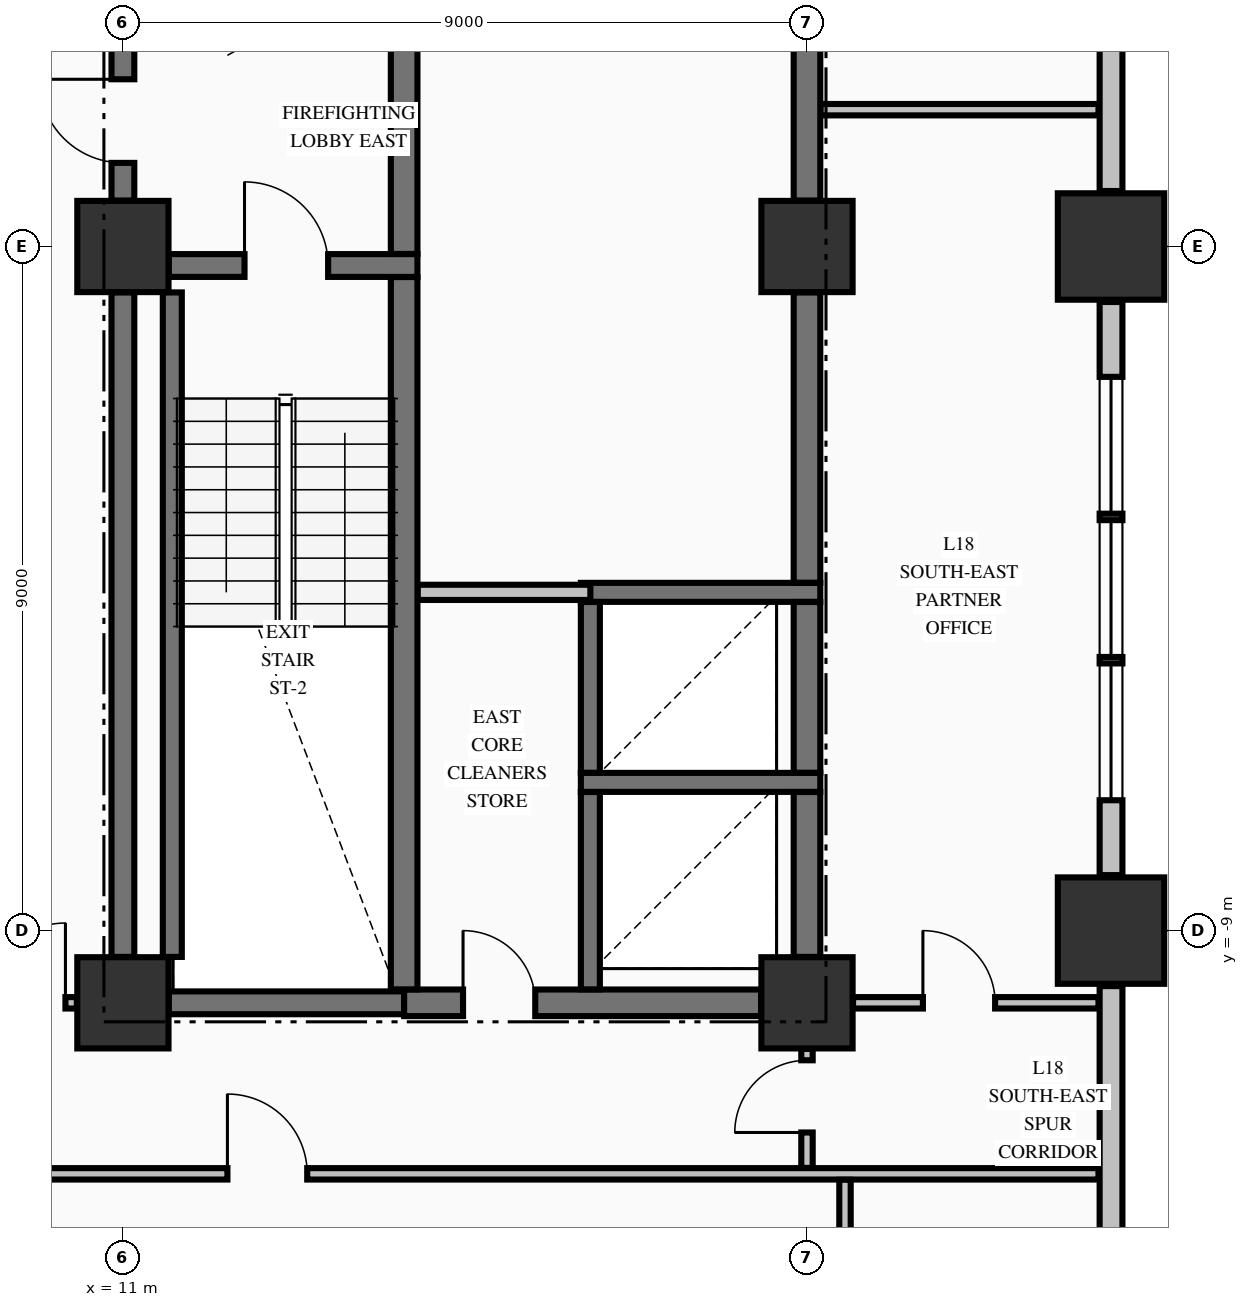
"""IFC4 building model, lengths in metres.
Left out: names, types, materials, properties, quantities, classifications, styles, units other than length and angle.
Written with IfcOpenShell. Run it as: python <this file> out.ifc"""

import sys

from ifc_helpers import new_model, si_unit, direction, frame, frame_2d, origin, origin_2d, place, context, subcontext, project, spatial, rectangle, extrude, element, fill, save


model = new_model("IFC4")
c1 = context("Model", 3, precision=1e-05, world=origin(), true_north=direction((0.0, 1.0)))
c2 = subcontext(c1, "Body", "Model", "MODEL_VIEW")
j1 = project(units=[si_unit("LENGTHUNIT", "METRE"), si_unit("PLANEANGLEUNIT", "RADIAN")], contexts=[c1])
p1 = place(None, origin())
s1 = spatial("IfcSite", under=j1, at=p1, CompositionType="ELEMENT")
p2 = place(p1, origin())
s2 = spatial("IfcBuilding", under=s1, at=p2, CompositionType="ELEMENT")
p3 = place(p2, frame((0.0, 0.0, 75.04)))
s3 = spatial("IfcBuildingStorey", under=s2, at=p3, CompositionType="ELEMENT", Elevation=75.04)
for number, where, z_axis, x_axis in (
    (1, (24.0, -9.0, -0.25), (0.0, 0.0, 1.0), (1.0, 0.0, 0.0)),
    (2, (24.0, 0.0, -0.25), (0.0, 0.0, 1.0), (1.0, 0.0, 0.0)),
):
    element("IfcColumn", number, at=place(p3, frame(where, z_axis=z_axis, x_axis=x_axis)), inside=s3, PredefinedType="COLUMN", context=c2, shape_type="SweptSolid", body=[
        extrude(rectangle(XDim=1.4, YDim=1.4, at=origin_2d()), origin(), (0.0, 0.0, 1.0), 3.57),
    ])
for number, where, z_axis, x_axis in (
    (3, (11.0, -9.95, -0.25), (0.0, 0.0, 1.0), (1.0, 0.0, 0.0)),
    (4, (11.0, 0.0, -0.25), (0.0, 0.0, 1.0), (1.0, 0.0, 0.0)),
    (5, (20.0, -9.95, -0.25), (0.0, 0.0, 1.0), (1.0, 0.0, 0.0)),
    (6, (20.0, 0.0, -0.25), (0.0, 0.0, 1.0), (1.0, 0.0, 0.0)),
):
    element("IfcColumn", number, at=place(p3, frame(where, z_axis=z_axis, x_axis=x_axis)), inside=s3, PredefinedType="COLUMN", context=c2, shape_type="SweptSolid", body=[
        extrude(rectangle(XDim=1.2, YDim=1.2, at=origin_2d()), origin(), (0.0, 0.0, 1.0), 3.57),
    ])
p4 = place(p3, frame((24.0, -22.27, 0.0), z_axis=(0.0, 0.0, 1.0), x_axis=(0.0, 1.0, 0.0)))
e7 = element("IfcWall", 7, at=p4, inside=s3, PredefinedType="STANDARD", context=c2, shape_type="SweptSolid", body=[
    extrude(rectangle(XDim=12.54, YDim=0.3, at=frame_2d((6.27, 0.0))), origin(), (0.0, 0.0, 1.0), 2.712),
])
p5 = place(p3, frame((24.0, -8.27, 0.0), z_axis=(0.0, 0.0, 1.0), x_axis=(0.0, 1.0, 0.0)))
e8 = element("IfcWall", 8, at=p5, inside=s3, PredefinedType="STANDARD", context=c2, shape_type="SweptSolid", body=[
    extrude(rectangle(XDim=7.54, YDim=0.3, at=frame_2d((3.77, 0.0))), origin(), (0.0, 0.0, 1.0), 2.712),
])
p6 = place(p5, frame((0.985, 0.0, 0.78)))
e9 = element("IfcOpeningElement", 9, at=p6, cuts=e8, PredefinedType="OPENING", context=c2, shape_type="SweptSolid", body=[
    extrude(rectangle(XDim=1.8, YDim=1.72, at=frame_2d((0.9, 0.86))), frame((0.0, 0.16, 0.0), z_axis=(0.0, -1.0, 0.0), x_axis=(1.0, 0.0, 0.0)), (0.0, 0.0, 1.0), 0.32),
])
p7 = place(p5, frame((2.87, 0.0, 0.78)))
e10 = element("IfcOpeningElement", 10, at=p7, cuts=e8, PredefinedType="OPENING", context=c2, shape_type="SweptSolid", body=[
    extrude(rectangle(XDim=1.8, YDim=1.72, at=frame_2d((0.9, 0.86))), frame((0.0, 0.16, 0.0), z_axis=(0.0, -1.0, 0.0), x_axis=(1.0, 0.0, 0.0)), (0.0, 0.0, 1.0), 0.32),
])
p8 = place(p5, frame((4.755, 0.0, 0.78)))
e11 = element("IfcOpeningElement", 11, at=p8, cuts=e8, PredefinedType="OPENING", context=c2, shape_type="SweptSolid", body=[
    extrude(rectangle(XDim=1.8, YDim=1.72, at=frame_2d((0.9, 0.86))), frame((0.0, 0.16, 0.0), z_axis=(0.0, -1.0, 0.0), x_axis=(1.0, 0.0, 0.0)), (0.0, 0.0, 1.0), 0.32),
])
p9 = place(p3, frame((24.0, 0.73, 0.0), z_axis=(0.0, 0.0, 1.0), x_axis=(0.0, 1.0, 0.0)))
e12 = element("IfcWall", 12, at=p9, inside=s3, PredefinedType="STANDARD", context=c2, shape_type="SweptSolid", body=[
    extrude(rectangle(XDim=7.54, YDim=0.3, at=frame_2d((3.77, 0.0))), origin(), (0.0, 0.0, 1.0), 2.712),
])
p10 = place(p9, frame((2.87, 0.0, 0.78)))
e13 = element("IfcOpeningElement", 13, at=p10, cuts=e12, PredefinedType="OPENING", context=c2, shape_type="SweptSolid", body=[
    extrude(rectangle(XDim=1.8, YDim=1.72, at=frame_2d((0.9, 0.86))), frame((0.0, 0.16, 0.0), z_axis=(0.0, -1.0, 0.0), x_axis=(1.0, 0.0, 0.0)), (0.0, 0.0, 1.0), 0.32),
])
p11 = place(p9, frame((4.755, 0.0, 0.78)))
e14 = element("IfcOpeningElement", 14, at=p11, cuts=e12, PredefinedType="OPENING", context=c2, shape_type="SweptSolid", body=[
    extrude(rectangle(XDim=1.8, YDim=1.72, at=frame_2d((0.9, 0.86))), frame((0.0, 0.16, 0.0), z_axis=(0.0, -1.0, 0.0), x_axis=(1.0, 0.0, 0.0)), (0.0, 0.0, 1.0), 0.32),
])
p12 = place(p3, frame((11.604, -9.95, 0.0), z_axis=(0.0, 0.0, 1.0), x_axis=(1.0, 0.0, 0.0)))
e15 = element("IfcWall", 15, at=p12, inside=s3, PredefinedType="SHEAR", context=c2, shape_type="SweptSolid", body=[
    extrude(rectangle(XDim=3.096, YDim=0.3, at=frame_2d((1.548, 0.0))), origin(), (0.0, 0.0, 1.0), 3.32),
])
p13 = place(p3, frame((14.7, -9.95, 0.0), z_axis=(0.0, 0.0, 1.0), x_axis=(1.0, 0.0, 0.0)))
e16 = element("IfcWall", 16, at=p13, inside=s3, PredefinedType="SHEAR", context=c2, shape_type="SweptSolid", body=[
    extrude(rectangle(XDim=4.696, YDim=0.35, at=frame_2d((2.348, 0.0))), origin(), (0.0, 0.0, 1.0), 3.32),
])
p14 = place(p13, frame((0.775, 0.0, 0.0)))
e17 = element("IfcOpeningElement", 17, at=p14, cuts=e16, PredefinedType="OPENING", context=c2, shape_type="SweptSolid", body=[
    extrude(rectangle(XDim=0.95, YDim=2.15, at=frame_2d((0.475, 1.075))), frame((0.0, 0.185, 0.0), z_axis=(0.0, -1.0, 0.0), x_axis=(1.0, 0.0, 0.0)), (0.0, 0.0, 1.0), 0.37),
])
for number, where, z_axis, x_axis in (
    (18, (17.025, -7.05, 0.0), (0.0, 0.0, 1.0), (1.0, 0.0, 0.0)),
    (19, (17.025, -4.55, 0.0), (0.0, 0.0, 1.0), (1.0, 0.0, 0.0)),
):
    element("IfcWall", number, at=place(p3, frame(where, z_axis=z_axis, x_axis=x_axis)), inside=s3, PredefinedType="SOLIDWALL", context=c2, shape_type="SweptSolid", body=[
        extrude(rectangle(XDim=3.15, YDim=0.25, at=frame_2d((1.575, 0.0))), origin(), (0.0, 0.0, 1.0), 3.32),
    ])
p15 = place(p3, frame((11.604, -0.25, 0.0), z_axis=(0.0, 0.0, 1.0), x_axis=(1.0, 0.0, 0.0)))
e20 = element("IfcWall", 20, at=p15, inside=s3, PredefinedType="SHEAR", context=c2, shape_type="SweptSolid", body=[
    extrude(rectangle(XDim=3.271, YDim=0.3, at=frame_2d((1.635, 0.0))), origin(), (0.0, 0.0, 1.0), 3.32),
])
p16 = place(p15, frame((0.996, 0.0, 0.0)))
e21 = element("IfcOpeningElement", 21, at=p16, cuts=e20, PredefinedType="OPENING", context=c2, shape_type="SweptSolid", body=[
    extrude(rectangle(XDim=1.1, YDim=2.15, at=frame_2d((0.55, 1.075))), frame((0.0, 0.16, 0.0), z_axis=(0.0, -1.0, 0.0), x_axis=(1.0, 0.0, 0.0)), (0.0, 0.0, 1.0), 0.32),
])
p17 = place(p3, frame((-28.835, -12.2, 0.0), z_axis=(0.0, 0.0, 1.0), x_axis=(1.0, 0.0, 0.0)))
e22 = element("IfcWall", 22, at=p17, inside=s3, PredefinedType="PARTITIONING", context=c2, shape_type="SweptSolid", body=[
    extrude(rectangle(XDim=52.67, YDim=0.15, at=frame_2d((26.335, 0.0))), origin(), (0.0, 0.0, 1.0), 3.32),
])
p18 = place(p17, frame((30.685, 0.0, 0.0)))
e23 = element("IfcOpeningElement", 23, at=p18, cuts=e22, PredefinedType="OPENING", context=c2, shape_type="SweptSolid", body=[
    extrude(rectangle(XDim=1.1, YDim=2.15, at=frame_2d((0.55, 1.075))), frame((0.0, 0.085, 0.0), z_axis=(0.0, -1.0, 0.0), x_axis=(1.0, 0.0, 0.0)), (0.0, 0.0, 1.0), 0.17),
])
p19 = place(p17, frame((15.41, 0.0, 0.0)))
e24 = element("IfcOpeningElement", 24, at=p19, cuts=e22, PredefinedType="OPENING", context=c2, shape_type="SweptSolid", body=[
    extrude(rectangle(XDim=1.05, YDim=2.15, at=frame_2d((0.525, 1.075))), frame((0.0, 0.085, 0.0), z_axis=(0.0, -1.0, 0.0), x_axis=(1.0, 0.0, 0.0)), (0.0, 0.0, 1.0), 0.17),
])
p20 = place(p17, frame((41.21, 0.0, 0.0)))
e25 = element("IfcOpeningElement", 25, at=p20, cuts=e22, PredefinedType="OPENING", context=c2, shape_type="SweptSolid", body=[
    extrude(rectangle(XDim=1.05, YDim=2.15, at=frame_2d((0.525, 1.075))), frame((0.0, 0.085, 0.0), z_axis=(0.0, -1.0, 0.0), x_axis=(1.0, 0.0, 0.0)), (0.0, 0.0, 1.0), 0.17),
])
p21 = place(p3, frame((-10.394, -9.95, 0.0), z_axis=(0.0, 0.0, 1.0), x_axis=(1.0, 0.0, 0.0)))
e26 = element("IfcWall", 26, at=p21, inside=s3, PredefinedType="PARTITIONING", context=c2, shape_type="SweptSolid", body=[
    extrude(rectangle(XDim=20.788, YDim=0.15, at=frame_2d((10.394, 0.0))), origin(), (0.0, 0.0, 1.0), 3.32),
])
p22 = place(p21, frame((0.15, 0.0, 0.0)))
e27 = element("IfcOpeningElement", 27, at=p22, cuts=e26, PredefinedType="OPENING", context=c2, shape_type="SweptSolid", body=[
    extrude(rectangle(XDim=1.05, YDim=2.15, at=frame_2d((0.525, 1.075))), frame((0.0, 0.085, 0.0), z_axis=(0.0, -1.0, 0.0), x_axis=(1.0, 0.0, 0.0)), (0.0, 0.0, 1.0), 0.17),
])
p23 = place(p21, frame((19.588, 0.0, 0.0)))
e28 = element("IfcOpeningElement", 28, at=p23, cuts=e26, PredefinedType="OPENING", context=c2, shape_type="SweptSolid", body=[
    extrude(rectangle(XDim=1.05, YDim=2.15, at=frame_2d((0.525, 1.075))), frame((0.0, 0.085, 0.0), z_axis=(0.0, -1.0, 0.0), x_axis=(1.0, 0.0, 0.0)), (0.0, 0.0, 1.0), 0.17),
])
p24 = place(p21, frame((11.769, 0.0, 0.0)))
e29 = element("IfcOpeningElement", 29, at=p24, cuts=e26, PredefinedType="OPENING", context=c2, shape_type="SweptSolid", body=[
    extrude(rectangle(XDim=0.95, YDim=2.15, at=frame_2d((0.475, 1.075))), frame((0.0, 0.085, 0.0), z_axis=(0.0, -1.0, 0.0), x_axis=(1.0, 0.0, 0.0)), (0.0, 0.0, 1.0), 0.17),
])
p25 = place(p3, frame((20.606, -9.95, 0.0), z_axis=(0.0, 0.0, 1.0), x_axis=(1.0, 0.0, 0.0)))
e30 = element("IfcWall", 30, at=p25, inside=s3, PredefinedType="PARTITIONING", context=c2, shape_type="SweptSolid", body=[
    extrude(rectangle(XDim=3.229, YDim=0.15, at=frame_2d((1.615, 0.0))), origin(), (0.0, 0.0, 1.0), 3.32),
])
p26 = place(p25, frame((0.919, 0.0, 0.0)))
e31 = element("IfcOpeningElement", 31, at=p26, cuts=e30, PredefinedType="OPENING", context=c2, shape_type="SweptSolid", body=[
    extrude(rectangle(XDim=0.95, YDim=2.15, at=frame_2d((0.475, 1.075))), frame((0.0, 0.085, 0.0), z_axis=(0.0, -1.0, 0.0), x_axis=(1.0, 0.0, 0.0)), (0.0, 0.0, 1.0), 0.17),
])
p27 = place(p3, frame((14.878, -4.55, 0.0), z_axis=(0.0, 0.0, 1.0), x_axis=(1.0, 0.0, 0.0)))
e32 = element("IfcWall", 32, at=p27, inside=s3, PredefinedType="PARTITIONING", context=c2, shape_type="SweptSolid", body=[
    extrude(rectangle(XDim=2.272, YDim=0.2, at=frame_2d((1.136, 0.0))), origin(), (0.0, 0.0, 1.0), 3.32),
])
p28 = place(p3, frame((20.178, 1.8, 0.0), z_axis=(0.0, 0.0, 1.0), x_axis=(1.0, 0.0, 0.0)))
e33 = element("IfcWall", 33, at=p28, inside=s3, PredefinedType="PARTITIONING", context=c2, shape_type="SweptSolid", body=[
    extrude(rectangle(XDim=3.657, YDim=0.15, at=frame_2d((1.829, 0.0))), origin(), (0.0, 0.0, 1.0), 3.32),
])
p29 = place(p3, frame((11.0, -9.346, 0.0), z_axis=(0.0, 0.0, 1.0), x_axis=(0.0, 1.0, 0.0)))
e34 = element("IfcWall", 34, at=p29, inside=s3, PredefinedType="SHEAR", context=c2, shape_type="SweptSolid", body=[
    extrude(rectangle(XDim=8.742, YDim=0.3, at=frame_2d((4.371, 0.0))), origin(), (0.0, 0.0, 1.0), 3.32),
])
p30 = place(p3, frame((11.0, 0.604, 0.0), z_axis=(0.0, 0.0, 1.0), x_axis=(0.0, 1.0, 0.0)))
e35 = element("IfcWall", 35, at=p30, inside=s3, PredefinedType="SHEAR", context=c2, shape_type="SweptSolid", body=[
    extrude(rectangle(XDim=2.144, YDim=0.3, at=frame_2d((1.072, 0.0))), origin(), (0.0, 0.0, 1.0), 3.32),
])
p31 = place(p30, frame((0.496, 0.0, 0.0)))
e36 = element("IfcOpeningElement", 36, at=p31, cuts=e35, PredefinedType="OPENING", context=c2, shape_type="SweptSolid", body=[
    extrude(rectangle(XDim=1.1, YDim=2.15, at=frame_2d((0.55, 1.075))), frame((0.0, 0.16, 0.0), z_axis=(0.0, -1.0, 0.0), x_axis=(1.0, 0.0, 0.0)), (0.0, 0.0, 1.0), 0.32),
])
p32 = place(p3, frame((11.65, -9.346, 0.0), z_axis=(0.0, 0.0, 1.0), x_axis=(0.0, 1.0, 0.0)))
e37 = element("IfcWall", 37, at=p32, inside=s3, PredefinedType="SOLIDWALL", context=c2, shape_type="SweptSolid", body=[
    extrude(rectangle(XDim=8.742, YDim=0.25, at=frame_2d((4.371, 0.0))), origin(), (0.0, 0.0, 1.0), 3.32),
])
p33 = place(p3, frame((14.7, -9.773, 0.0), z_axis=(0.0, 0.0, 1.0), x_axis=(0.0, 1.0, 0.0)))
e38 = element("IfcWall", 38, at=p33, inside=s3, PredefinedType="SHEAR", context=c2, shape_type="SweptSolid", body=[
    extrude(rectangle(XDim=9.371, YDim=0.35, at=frame_2d((4.686, 0.0))), origin(), (0.0, 0.0, 1.0), 3.32),
])
p34 = place(p3, frame((14.7, -0.098, 0.0), z_axis=(0.0, 0.0, 1.0), x_axis=(0.0, 1.0, 0.0)))
e39 = element("IfcWall", 39, at=p34, inside=s3, PredefinedType="SHEAR", context=c2, shape_type="SweptSolid", body=[
    extrude(rectangle(XDim=2.846, YDim=0.35, at=frame_2d((1.423, 0.0))), origin(), (0.0, 0.0, 1.0), 3.32),
])
p35 = place(p3, frame((17.15, -9.773, 0.0), z_axis=(0.0, 0.0, 1.0), x_axis=(0.0, 1.0, 0.0)))
e40 = element("IfcWall", 40, at=p35, inside=s3, PredefinedType="SOLIDWALL", context=c2, shape_type="SweptSolid", body=[
    extrude(rectangle(XDim=2.596, YDim=0.25, at=frame_2d((1.298, 0.0))), origin(), (0.0, 0.0, 1.0), 3.32),
])
p36 = place(p3, frame((17.15, -6.923, 0.0), z_axis=(0.0, 0.0, 1.0), x_axis=(0.0, 1.0, 0.0)))
e41 = element("IfcWall", 41, at=p36, inside=s3, PredefinedType="SOLIDWALL", context=c2, shape_type="SweptSolid", body=[
    extrude(rectangle(XDim=2.246, YDim=0.25, at=frame_2d((1.123, 0.0))), origin(), (0.0, 0.0, 1.0), 3.32),
])
p37 = place(p3, frame((20.0, -9.346, 0.0), z_axis=(0.0, 0.0, 1.0), x_axis=(0.0, 1.0, 0.0)))
e42 = element("IfcWall", 42, at=p37, inside=s3, PredefinedType="SHEAR", context=c2, shape_type="SweptSolid", body=[
    extrude(rectangle(XDim=2.169, YDim=0.35, at=frame_2d((1.084, 0.0))), origin(), (0.0, 0.0, 1.0), 3.32),
])
p38 = place(p3, frame((20.0, -6.923, 0.0), z_axis=(0.0, 0.0, 1.0), x_axis=(0.0, 1.0, 0.0)))
e43 = element("IfcWall", 43, at=p38, inside=s3, PredefinedType="SHEAR", context=c2, shape_type="SweptSolid", body=[
    extrude(rectangle(XDim=2.246, YDim=0.35, at=frame_2d((1.123, 0.0))), origin(), (0.0, 0.0, 1.0), 3.32),
])
p39 = place(p3, frame((20.0, -4.423, 0.0), z_axis=(0.0, 0.0, 1.0), x_axis=(0.0, 1.0, 0.0)))
e44 = element("IfcWall", 44, at=p39, inside=s3, PredefinedType="SHEAR", context=c2, shape_type="SweptSolid", body=[
    extrude(rectangle(XDim=3.819, YDim=0.35, at=frame_2d((1.91, 0.0))), origin(), (0.0, 0.0, 1.0), 3.32),
])
p40 = place(p3, frame((20.0, 0.604, 0.0), z_axis=(0.0, 0.0, 1.0), x_axis=(0.0, 1.0, 0.0)))
e45 = element("IfcWall", 45, at=p40, inside=s3, PredefinedType="SHEAR", context=c2, shape_type="SweptSolid", body=[
    extrude(rectangle(XDim=9.292, YDim=0.35, at=frame_2d((4.646, 0.0))), origin(), (0.0, 0.0, 1.0), 3.32),
])
p41 = place(p3, frame((20.0, -12.122, 0.0), z_axis=(0.0, 0.0, 1.0), x_axis=(0.0, 1.0, 0.0)))
e46 = element("IfcWall", 46, at=p41, inside=s3, PredefinedType="PARTITIONING", context=c2, shape_type="SweptSolid", body=[
    extrude(rectangle(XDim=1.566, YDim=0.15, at=frame_2d((0.783, 0.0))), origin(), (0.0, 0.0, 1.0), 3.32),
])
p42 = place(p41, frame((0.466, 0.0, 0.0)))
e47 = element("IfcOpeningElement", 47, at=p42, cuts=e46, PredefinedType="OPENING", context=c2, shape_type="SweptSolid", body=[
    extrude(rectangle(XDim=0.95, YDim=2.15, at=frame_2d((0.475, 1.075))), frame((0.0, 0.085, 0.0), z_axis=(0.0, -1.0, 0.0), x_axis=(1.0, 0.0, 0.0)), (0.0, 0.0, 1.0), 0.17),
])
p43 = place(p3, frame((20.5, -22.294, 0.0), z_axis=(0.0, 0.0, 1.0), x_axis=(0.0, 1.0, 0.0)))
e48 = element("IfcWall", 48, at=p43, inside=s3, PredefinedType="PARTITIONING", context=c2, shape_type="SweptSolid", body=[
    extrude(rectangle(XDim=10.016, YDim=0.15, at=frame_2d((5.008, 0.0))), origin(), (0.0, 0.0, 1.0), 3.32),
])
p44 = place(p6, origin())
e49 = element("IfcWindow", 49, at=p44, inside=s3, PartitioningType="SINGLE_PANEL", PredefinedType="WINDOW", context=c2, shape_type="SweptSolid", body=[
    extrude(rectangle(XDim=1.8, YDim=1.72, at=frame_2d((0.9, 0.86))), frame((0.0, 0.03, 0.0), z_axis=(0.0, -1.0, 0.0), x_axis=(1.0, 0.0, 0.0)), (0.0, 0.0, 1.0), 0.06),
])
fill(e9, e49)
p45 = place(p7, origin())
e50 = element("IfcWindow", 50, at=p45, inside=s3, PartitioningType="SINGLE_PANEL", PredefinedType="WINDOW", context=c2, shape_type="SweptSolid", body=[
    extrude(rectangle(XDim=1.8, YDim=1.72, at=frame_2d((0.9, 0.86))), frame((0.0, 0.03, 0.0), z_axis=(0.0, -1.0, 0.0), x_axis=(1.0, 0.0, 0.0)), (0.0, 0.0, 1.0), 0.06),
])
fill(e10, e50)
p46 = place(p8, origin())
e51 = element("IfcWindow", 51, at=p46, inside=s3, PartitioningType="SINGLE_PANEL", PredefinedType="WINDOW", context=c2, shape_type="SweptSolid", body=[
    extrude(rectangle(XDim=1.8, YDim=1.72, at=frame_2d((0.9, 0.86))), frame((0.0, 0.03, 0.0), z_axis=(0.0, -1.0, 0.0), x_axis=(1.0, 0.0, 0.0)), (0.0, 0.0, 1.0), 0.06),
])
fill(e11, e51)
p47 = place(p16, origin())
e52 = element("IfcDoor", 52, at=p47, inside=s3, OperationType="SINGLE_SWING_LEFT", PredefinedType="DOOR", context=c2, shape_type="SweptSolid", body=[
    extrude(rectangle(XDim=1.1, YDim=2.15, at=frame_2d((0.55, 1.075))), frame((0.0, 0.025, 0.0), z_axis=(0.0, -1.0, 0.0), x_axis=(1.0, 0.0, 0.0)), (0.0, 0.0, 1.0), 0.05),
])
fill(e21, e52)
p48 = place(p31, origin())
e53 = element("IfcDoor", 53, at=p48, inside=s3, OperationType="SINGLE_SWING_RIGHT", PredefinedType="DOOR", context=c2, shape_type="SweptSolid", body=[
    extrude(rectangle(XDim=1.1, YDim=2.15, at=frame_2d((0.55, 1.075))), frame((0.0, 0.025, 0.0), z_axis=(0.0, -1.0, 0.0), x_axis=(1.0, 0.0, 0.0)), (0.0, 0.0, 1.0), 0.05),
])
fill(e36, e53)
p49 = place(p14, origin())
e54 = element("IfcDoor", 54, at=p49, inside=s3, OperationType="SINGLE_SWING_LEFT", PredefinedType="DOOR", context=c2, shape_type="SweptSolid", body=[
    extrude(rectangle(XDim=0.95, YDim=2.15, at=frame_2d((0.475, 1.075))), frame((0.0, 0.025, 0.0), z_axis=(0.0, -1.0, 0.0), x_axis=(1.0, 0.0, 0.0)), (0.0, 0.0, 1.0), 0.05),
])
fill(e17, e54)
p50 = place(p23, origin())
e55 = element("IfcDoor", 55, at=p50, inside=s3, OperationType="SINGLE_SWING_RIGHT", PredefinedType="DOOR", context=c2, shape_type="SweptSolid", body=[
    extrude(rectangle(XDim=1.05, YDim=2.15, at=frame_2d((0.525, 1.075))), frame((0.0, 0.025, 0.0), z_axis=(0.0, -1.0, 0.0), x_axis=(1.0, 0.0, 0.0)), (0.0, 0.0, 1.0), 0.05),
])
fill(e28, e55)
p51 = place(p20, origin())
e56 = element("IfcDoor", 56, at=p51, inside=s3, OperationType="SINGLE_SWING_LEFT", PredefinedType="DOOR", context=c2, shape_type="SweptSolid", body=[
    extrude(rectangle(XDim=1.05, YDim=2.15, at=frame_2d((0.525, 1.075))), frame((0.0, 0.025, 0.0), z_axis=(0.0, -1.0, 0.0), x_axis=(1.0, 0.0, 0.0)), (0.0, 0.0, 1.0), 0.05),
])
fill(e25, e56)
p52 = place(p42, origin())
e57 = element("IfcDoor", 57, at=p52, inside=s3, OperationType="SINGLE_SWING_LEFT", PredefinedType="DOOR", context=c2, shape_type="SweptSolid", body=[
    extrude(rectangle(XDim=0.95, YDim=2.15, at=frame_2d((0.475, 1.075))), frame((0.0, 0.025, 0.0), z_axis=(0.0, -1.0, 0.0), x_axis=(1.0, 0.0, 0.0)), (0.0, 0.0, 1.0), 0.05),
])
fill(e47, e57)
p53 = place(p26, origin())
e58 = element("IfcDoor", 58, at=p53, inside=s3, OperationType="SINGLE_SWING_LEFT", PredefinedType="DOOR", context=c2, shape_type="SweptSolid", body=[
    extrude(rectangle(XDim=0.95, YDim=2.15, at=frame_2d((0.475, 1.075))), frame((0.0, 0.025, 0.0), z_axis=(0.0, -1.0, 0.0), x_axis=(1.0, 0.0, 0.0)), (0.0, 0.0, 1.0), 0.05),
])
fill(e31, e58)
save(model, sys.argv[1])
